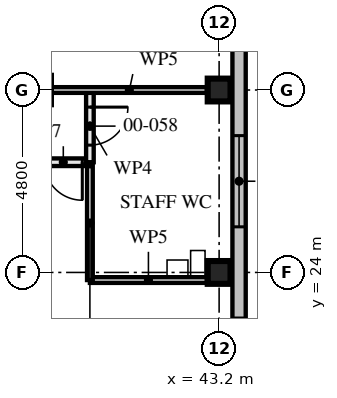
"""IFC4 building model, lengths in metres.
Left out: names, types, materials, properties, quantities, classifications, styles, units other than length and angle.
Written with IfcOpenShell. Run it as: python <this file> out.ifc"""

import sys

from ifc_helpers import new_model, si_unit, direction, frame, frame_2d, origin, origin_2d, place, context, subcontext, project, spatial, rectangle, hollow_rectangle, extrude, element, fill, save


model = new_model("IFC4")
c1 = context("Model", 3, precision=1e-05, world=origin(), true_north=direction((0.0, 1.0)))
c2 = subcontext(c1, "Body", "Model", "MODEL_VIEW")
j1 = project(units=[si_unit("LENGTHUNIT", "METRE"), si_unit("PLANEANGLEUNIT", "RADIAN")], contexts=[c1])
p1 = place(None, origin())
s1 = spatial("IfcSite", under=j1, at=p1, CompositionType="ELEMENT")
p2 = place(p1, origin())
s2 = spatial("IfcBuilding", under=s1, at=p2, CompositionType="ELEMENT")
p3 = place(p2, origin())
s3 = spatial("IfcBuildingStorey", under=s2, at=p3, CompositionType="ELEMENT", Elevation=0.0)
for number, where, z_axis, x_axis in (
    (1, (43.2, 24.0, 0.0), (0.0, 0.0, 1.0), (1.0, 0.0, 0.0)),
    (2, (43.2, 28.8, 0.0), (0.0, 0.0, 1.0), (0.0, 1.0, 0.0)),
):
    element("IfcColumn", number, at=place(p3, frame(where, z_axis=z_axis, x_axis=x_axis)), inside=s3, PredefinedType="COLUMN", context=c2, shape_type="SweptSolid", body=[
        extrude(hollow_rectangle(XDim=0.6, YDim=0.6, WallThickness=0.08, at=origin_2d()), origin(), (0.0, 0.0, 1.0), 4.5),
    ])
p4 = place(p3, frame((43.725, 14.925, 0.0), z_axis=(0.0, 0.0, 1.0), x_axis=(0.0, 1.0, 0.0)))
e3 = element("IfcWall", 3, at=p4, inside=s3, PredefinedType="SOLIDWALL", context=c2, shape_type="SweptSolid", body=[
    extrude(rectangle(XDim=38.4, YDim=0.35, at=frame_2d((19.2, 0.0))), origin(), (0.0, 0.0, 1.0), 4.5),
])
p5 = place(p4, frame((15.675, 0.0, 0.0)))
e4 = element("IfcOpeningElement", 4, at=p5, cuts=e3, PredefinedType="OPENING", context=c2, shape_type="SweptSolid", body=[
    extrude(rectangle(XDim=1.2, YDim=2.4, at=frame_2d((0.6, 1.2))), frame((0.0, 0.186, 0.0), z_axis=(0.0, -1.0, 0.0), x_axis=(1.0, 0.0, 0.0)), (0.0, 0.0, 1.0), 0.371),
])
p6 = place(p4, frame((0.675, 0.0, 0.9)))
e5 = element("IfcOpeningElement", 5, at=p6, cuts=e3, PredefinedType="OPENING", context=c2, shape_type="SweptSolid", body=[
    extrude(rectangle(XDim=2.4, YDim=2.4, at=frame_2d((1.2, 1.2))), frame((0.0, 0.186, 0.0), z_axis=(0.0, -1.0, 0.0), x_axis=(1.0, 0.0, 0.0)), (0.0, 0.0, 1.0), 0.371),
])
p7 = place(p4, frame((5.475, 0.0, 0.9)))
e6 = element("IfcOpeningElement", 6, at=p7, cuts=e3, PredefinedType="OPENING", context=c2, shape_type="SweptSolid", body=[
    extrude(rectangle(XDim=2.4, YDim=2.4, at=frame_2d((1.2, 1.2))), frame((0.0, 0.186, 0.0), z_axis=(0.0, -1.0, 0.0), x_axis=(1.0, 0.0, 0.0)), (0.0, 0.0, 1.0), 0.371),
])
p8 = place(p4, frame((10.275, 0.0, 0.9)))
e7 = element("IfcOpeningElement", 7, at=p8, cuts=e3, PredefinedType="OPENING", context=c2, shape_type="SweptSolid", body=[
    extrude(rectangle(XDim=2.4, YDim=2.4, at=frame_2d((1.2, 1.2))), frame((0.0, 0.186, 0.0), z_axis=(0.0, -1.0, 0.0), x_axis=(1.0, 0.0, 0.0)), (0.0, 0.0, 1.0), 0.371),
])
p9 = place(p4, frame((19.875, 0.0, 0.9)))
e8 = element("IfcOpeningElement", 8, at=p9, cuts=e3, PredefinedType="OPENING", context=c2, shape_type="SweptSolid", body=[
    extrude(rectangle(XDim=2.4, YDim=2.4, at=frame_2d((1.2, 1.2))), frame((0.0, 0.186, 0.0), z_axis=(0.0, -1.0, 0.0), x_axis=(1.0, 0.0, 0.0)), (0.0, 0.0, 1.0), 0.371),
])
p10 = place(p4, frame((24.675, 0.0, 0.9)))
e9 = element("IfcOpeningElement", 9, at=p10, cuts=e3, PredefinedType="OPENING", context=c2, shape_type="SweptSolid", body=[
    extrude(rectangle(XDim=2.4, YDim=2.4, at=frame_2d((1.2, 1.2))), frame((0.0, 0.186, 0.0), z_axis=(0.0, -1.0, 0.0), x_axis=(1.0, 0.0, 0.0)), (0.0, 0.0, 1.0), 0.371),
])
p11 = place(p4, frame((29.475, 0.0, 0.9)))
e10 = element("IfcOpeningElement", 10, at=p11, cuts=e3, PredefinedType="OPENING", context=c2, shape_type="SweptSolid", body=[
    extrude(rectangle(XDim=2.4, YDim=2.4, at=frame_2d((1.2, 1.2))), frame((0.0, 0.186, 0.0), z_axis=(0.0, -1.0, 0.0), x_axis=(1.0, 0.0, 0.0)), (0.0, 0.0, 1.0), 0.371),
])
p12 = place(p4, frame((34.275, 0.0, 0.9)))
e11 = element("IfcOpeningElement", 11, at=p12, cuts=e3, PredefinedType="OPENING", context=c2, shape_type="SweptSolid", body=[
    extrude(rectangle(XDim=2.4, YDim=2.4, at=frame_2d((1.2, 1.2))), frame((0.0, 0.186, 0.0), z_axis=(0.0, -1.0, 0.0), x_axis=(1.0, 0.0, 0.0)), (0.0, 0.0, 1.0), 0.371),
])
p13 = place(p3, frame((39.8, 23.8, 0.0), z_axis=(0.0, 0.0, 1.0), x_axis=(0.0, 1.0, 0.0)))
e12 = element("IfcWall", 12, at=p13, inside=s3, PredefinedType="PARTITIONING", context=c2, shape_type="SweptSolid", body=[
    extrude(rectangle(XDim=3.0, YDim=0.15, at=frame_2d((1.5, 0.0))), origin(), (0.0, 0.0, 1.0), 3.55),
])
p14 = place(p3, frame((39.8, 23.8, 0.0), z_axis=(0.0, 0.0, 1.0), x_axis=(1.0, 0.0, 0.0)))
e13 = element("IfcWall", 13, at=p14, inside=s3, PredefinedType="PARTITIONING", context=c2, shape_type="SweptSolid", body=[
    extrude(rectangle(XDim=3.08, YDim=0.15, at=frame_2d((1.54, 0.0))), origin(), (0.0, 0.0, 1.0), 4.33),
])
p15 = place(p3, frame((28.8, 26.9, 0.0), z_axis=(0.0, 0.0, 1.0), x_axis=(1.0, 0.0, 0.0)))
e14 = element("IfcWall", 14, at=p15, inside=s3, PredefinedType="PARTITIONING", context=c2, shape_type="SweptSolid", body=[
    extrude(rectangle(XDim=11.0, YDim=0.2, at=frame_2d((5.5, 0.0))), origin(), (0.0, 0.0, 1.0), 4.33),
])
p16 = place(p15, frame((0.2, 0.0, 0.0)))
e15 = element("IfcOpeningElement", 15, at=p16, cuts=e14, PredefinedType="OPENING", context=c2, shape_type="SweptSolid", body=[
    extrude(rectangle(XDim=1.0, YDim=2.4, at=frame_2d((0.5, 1.2))), frame((0.0, 0.111, 0.0), z_axis=(0.0, -1.0, 0.0), x_axis=(1.0, 0.0, 0.0)), (0.0, 0.0, 1.0), 0.221),
])
p17 = place(p15, frame((5.0, 0.0, 0.0)))
e16 = element("IfcOpeningElement", 16, at=p17, cuts=e14, PredefinedType="OPENING", context=c2, shape_type="SweptSolid", body=[
    extrude(rectangle(XDim=1.0, YDim=2.4, at=frame_2d((0.5, 1.2))), frame((0.0, 0.111, 0.0), z_axis=(0.0, -1.0, 0.0), x_axis=(1.0, 0.0, 0.0)), (0.0, 0.0, 1.0), 0.221),
])
p18 = place(p15, frame((9.8, 0.0, 0.0)))
e17 = element("IfcOpeningElement", 17, at=p18, cuts=e14, PredefinedType="OPENING", context=c2, shape_type="SweptSolid", body=[
    extrude(rectangle(XDim=1.0, YDim=2.4, at=frame_2d((0.5, 1.2))), frame((0.0, 0.111, 0.0), z_axis=(0.0, -1.0, 0.0), x_axis=(1.0, 0.0, 0.0)), (0.0, 0.0, 1.0), 0.221),
])
p19 = place(p15, frame((2.65, 0.0, 0.0)))
e18 = element("IfcOpeningElement", 18, at=p19, cuts=e14, PredefinedType="OPENING", context=c2, shape_type="SweptSolid", body=[
    extrude(rectangle(XDim=0.9, YDim=2.1, at=frame_2d((0.45, 1.05))), frame((0.0, 0.111, 0.0), z_axis=(0.0, -1.0, 0.0), x_axis=(1.0, 0.0, 0.0)), (0.0, 0.0, 1.0), 0.221),
])
p20 = place(p15, frame((7.4, 0.0, 0.0)))
e19 = element("IfcOpeningElement", 19, at=p20, cuts=e14, PredefinedType="OPENING", context=c2, shape_type="SweptSolid", body=[
    extrude(rectangle(XDim=1.0, YDim=2.1, at=frame_2d((0.5, 1.05))), frame((0.0, 0.111, 0.0), z_axis=(0.0, -1.0, 0.0), x_axis=(1.0, 0.0, 0.0)), (0.0, 0.0, 1.0), 0.221),
])
p21 = place(p3, frame((42.88, 28.8, 0.0), z_axis=(0.0, 0.0, 1.0), x_axis=(-1.0, 0.0, 0.0)))
e20 = element("IfcWall", 20, at=p21, inside=s3, PredefinedType="PARTITIONING", context=c2, shape_type="SweptSolid", body=[
    extrude(rectangle(XDim=4.085, YDim=0.15, at=frame_2d((2.042, 0.0))), origin(), (0.0, 0.0, 1.0), 3.32),
])
p22 = place(p3, frame((39.8, 26.9, 0.0), z_axis=(0.0, 0.0, 1.0), x_axis=(0.0, 1.0, 0.0)))
e21 = element("IfcWall", 21, at=p22, inside=s3, PredefinedType="PARTITIONING", context=c2, shape_type="SweptSolid", body=[
    extrude(rectangle(XDim=1.9, YDim=0.2, at=frame_2d((0.95, 0.0))), origin(), (0.0, 0.0, 1.0), 4.33),
])
p23 = place(p22, frame((0.45, 0.0, 0.0)))
e22 = element("IfcOpeningElement", 22, at=p23, cuts=e21, PredefinedType="OPENING", context=c2, shape_type="SweptSolid", body=[
    extrude(rectangle(XDim=1.0, YDim=2.1, at=frame_2d((0.5, 1.05))), frame((0.0, 0.111, 0.0), z_axis=(0.0, -1.0, 0.0), x_axis=(1.0, 0.0, 0.0)), (0.0, 0.0, 1.0), 0.221),
])
p24 = place(p8, origin())
e23 = element("IfcWindow", 23, at=p24, inside=s3, PartitioningType="SINGLE_PANEL", PredefinedType="WINDOW", context=c2, shape_type="SweptSolid", body=[
    extrude(rectangle(XDim=2.4, YDim=2.4, at=frame_2d((1.2, 1.2))), frame((0.0, 0.03, 0.0), z_axis=(0.0, -1.0, 0.0), x_axis=(1.0, 0.0, 0.0)), (0.0, 0.0, 1.0), 0.06),
])
fill(e7, e23)
p25 = place(p18, frame((1.0, 0.0, 0.0), z_axis=(0.0, 0.0, 1.0), x_axis=(-1.0, 0.0, 0.0)))
e24 = element("IfcDoor", 24, at=p25, inside=s3, OperationType="SINGLE_SWING_RIGHT", PredefinedType="DOOR", context=c2, shape_type="SweptSolid", body=[
    extrude(rectangle(XDim=1.0, YDim=2.4, at=frame_2d((0.5, 1.2))), frame((0.0, 0.027, 0.0), z_axis=(0.0, -1.0, 0.0), x_axis=(1.0, 0.0, 0.0)), (0.0, 0.0, 1.0), 0.054),
])
fill(e17, e24)
p26 = place(p23, frame((1.0, 0.0, 0.0), z_axis=(0.0, 0.0, 1.0), x_axis=(-1.0, 0.0, 0.0)))
e25 = element("IfcDoor", 25, at=p26, inside=s3, OperationType="SINGLE_SWING_RIGHT", PredefinedType="DOOR", context=c2, shape_type="SweptSolid", body=[
    extrude(rectangle(XDim=1.0, YDim=2.1, at=frame_2d((0.5, 1.05))), frame((0.0, 0.027, 0.0), z_axis=(0.0, -1.0, 0.0), x_axis=(1.0, 0.0, 0.0)), (0.0, 0.0, 1.0), 0.054),
])
fill(e22, e25)
save(model, sys.argv[1])
